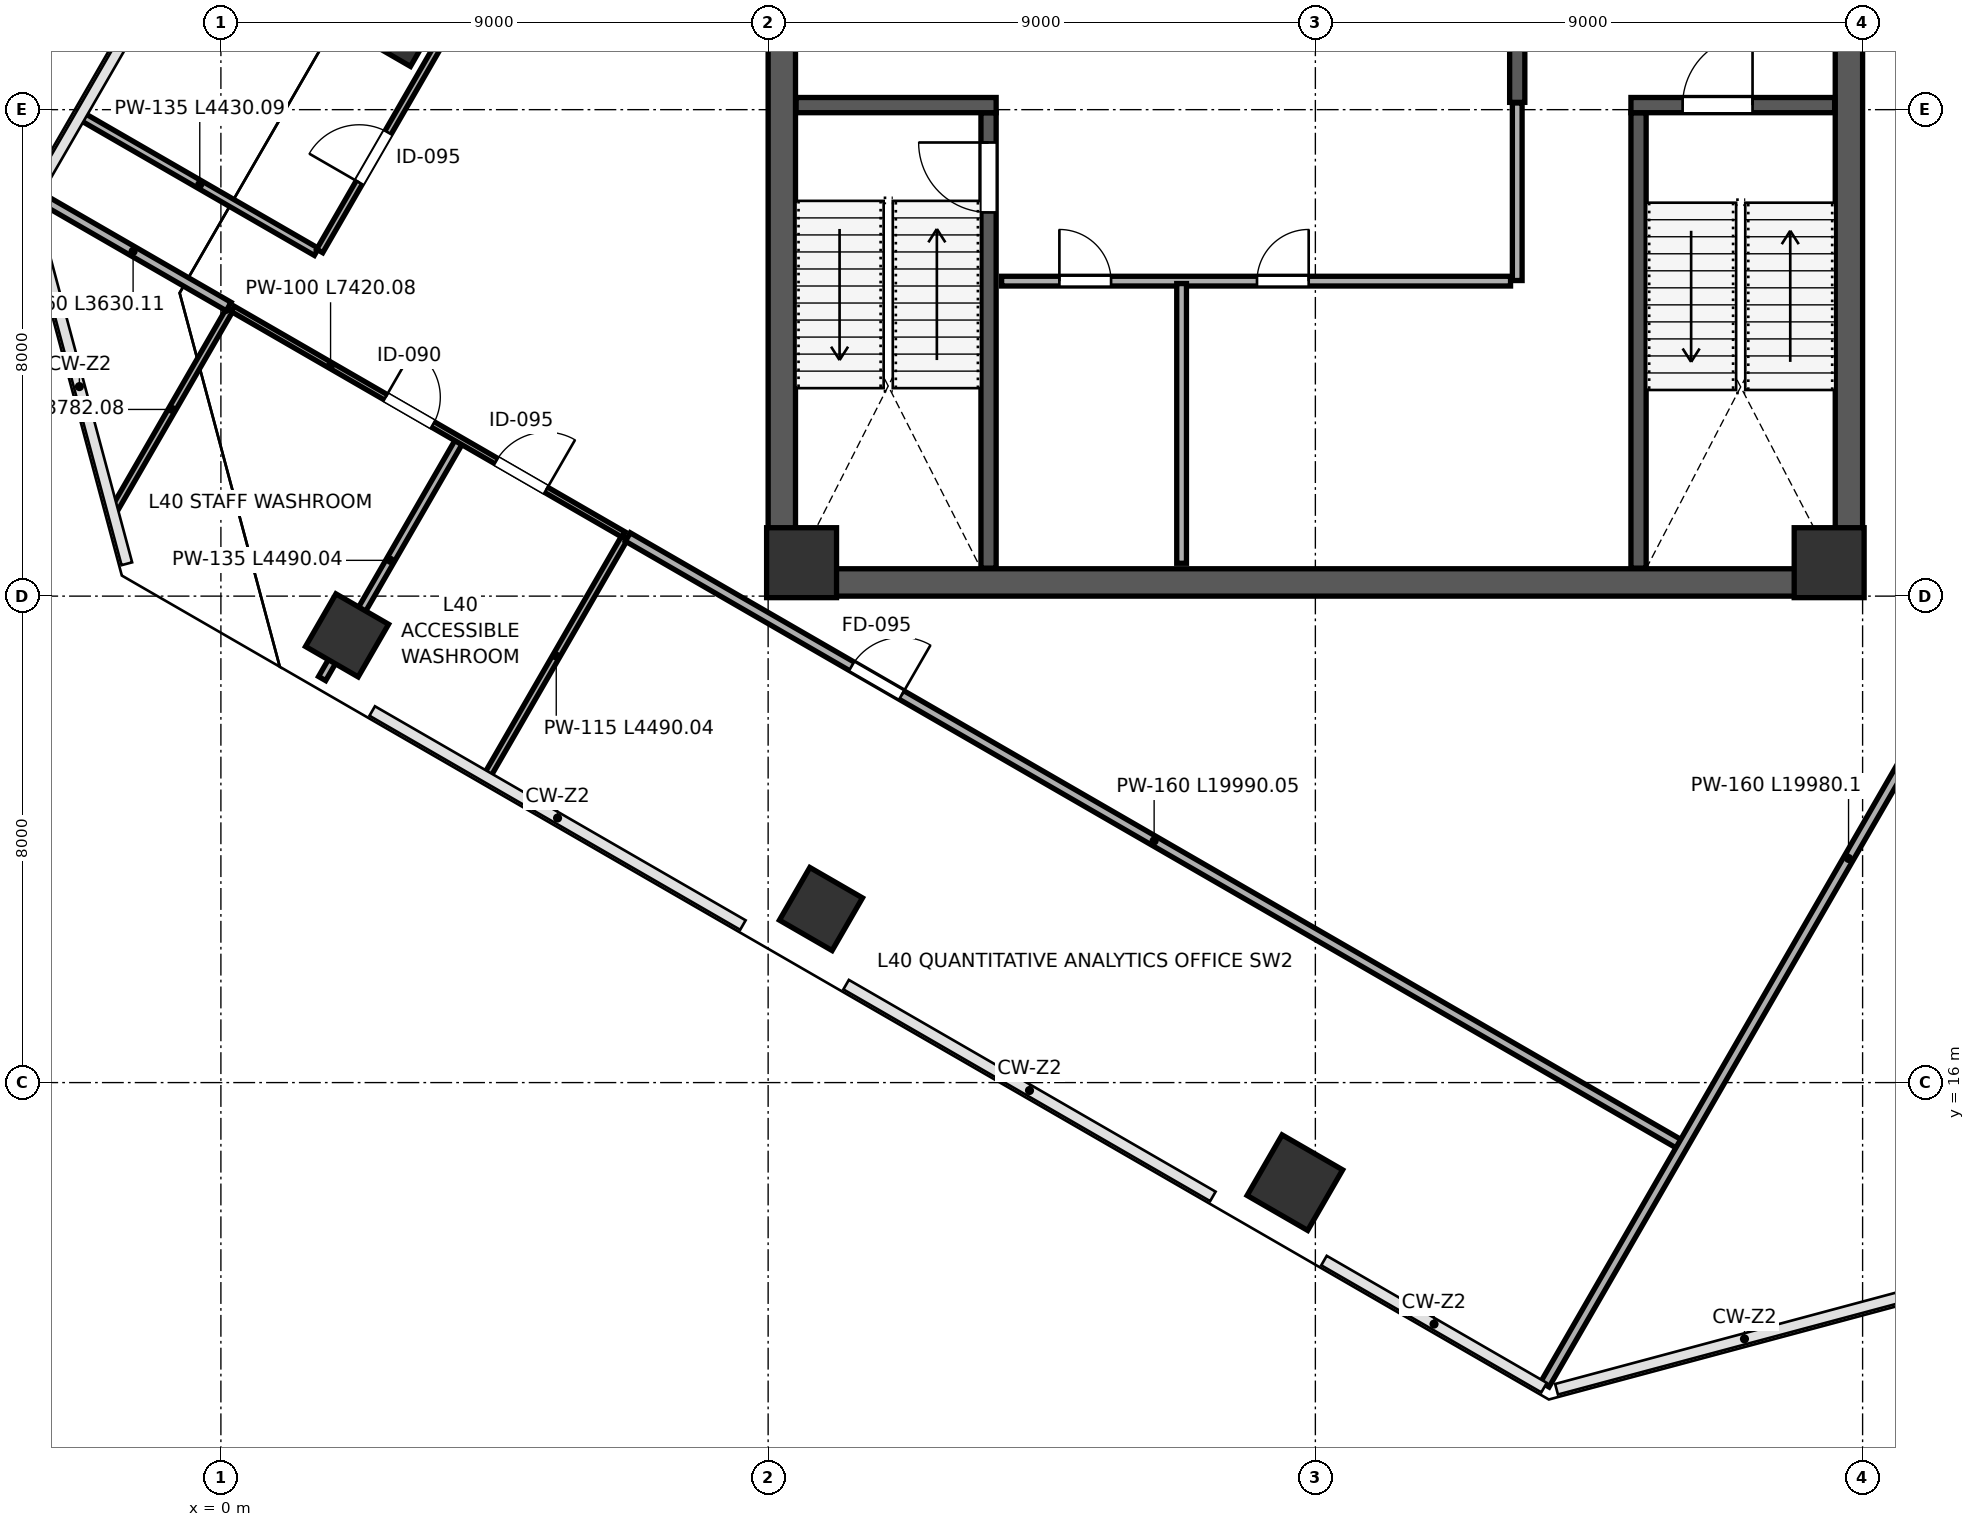
"""IFC4 building model, lengths in metres.
Left out: names, types, materials, properties, quantities, classifications, styles, units other than length and angle.
Written with IfcOpenShell. Run it as: python <this file> out.ifc"""

import sys

from ifc_helpers import new_model, si_unit, direction, frame, frame_2d, origin, origin_2d, place, context, subcontext, project, spatial, rectangle, extrude, source, transform, mapped, element, fill, save


model = new_model("IFC4")
c1 = context("Model", 3, precision=1e-05, world=origin(), true_north=direction((0.0, 1.0)))
c2 = subcontext(c1, "Body", "Model", "MODEL_VIEW")
j1 = project(units=[si_unit("LENGTHUNIT", "METRE"), si_unit("PLANEANGLEUNIT", "RADIAN")], contexts=[c1])
p1 = place(None, origin())
s1 = spatial("IfcSite", under=j1, at=p1, CompositionType="ELEMENT")
p2 = place(p1, origin())
s2 = spatial("IfcBuilding", under=s1, at=p2, CompositionType="ELEMENT")
p3 = place(p2, frame((0.0, 0.0, 179.2)))
s3 = spatial("IfcBuildingStorey", under=s2, at=p3, CompositionType="ELEMENT", Elevation=179.2)
m1 = source(origin(), c2, "Body", "SweptSolid", [
    extrude(rectangle(XDim=1.15, YDim=1.15, at=origin_2d()), origin(), (0.0, 0.0, 1.0), 4.198),
])
for number, where, z_axis, x_axis in (
    (1, (9.55, 24.55, 0.001), (0.0, 0.0, 1.0), (1.0, 0.0, 0.0)),
    (2, (26.45, 24.55, 0.001), (0.0, 0.0, 1.0), (1.0, 0.0, 0.0)),
):
    element("IfcColumn", number, at=place(p3, frame(where, z_axis=z_axis, x_axis=x_axis)), inside=s3, PredefinedType="COLUMN", context=c2, shape_type="MappedRepresentation", body=[
        mapped(m1, transform((0.0, 0.0, 0.0), scale=1.0)),
    ])
m2 = source(origin(), c2, "Body", "SweptSolid", [
    extrude(rectangle(XDim=1.0, YDim=1.0, at=origin_2d()), origin(), (0.0, 0.0, 1.0), 4.198),
])
for number, where, z_axis, x_axis in (
    (3, (2.075, 23.354, 0.001), (0.0, 0.0, 1.0), (-0.866, 0.5, 0.0)),
    (4, (9.869, 18.854, 0.001), (0.0, 0.0, 1.0), (-0.866, 0.5, 0.0)),
):
    element("IfcColumn", number, at=place(p3, frame(where, z_axis=z_axis, x_axis=x_axis)), inside=s3, PredefinedType="COLUMN", context=c2, shape_type="MappedRepresentation", body=[
        mapped(m2, transform((0.0, 0.0, 0.0), scale=1.0)),
    ])
m3 = source(origin(), c2, "Body", "SweptSolid", [
    extrude(rectangle(XDim=1.15, YDim=1.15, at=origin_2d()), origin(), (0.0, 0.0, 1.0), 4.198),
])
for number, where, z_axis, x_axis in (
    (5, (17.663, 14.354, 0.001), (0.0, 0.0, 1.0), (-0.866, 0.5, 0.0)),
    (6, (2.907, 33.497, 0.001), (0.0, 0.0, 1.0), (-0.866, 0.5, 0.0)),
):
    element("IfcColumn", number, at=place(p3, frame(where, z_axis=z_axis, x_axis=x_axis)), inside=s3, PredefinedType="COLUMN", context=c2, shape_type="MappedRepresentation", body=[
        mapped(m3, transform((0.0, 0.0, 0.0), scale=1.0)),
    ])
p4 = place(p3, frame((9.225, 24.45, 0.0), z_axis=(0.0, 0.0, 1.0), x_axis=(0.0, 1.0, 0.0)))
e7 = element("IfcWall", 7, at=p4, inside=s3, PredefinedType="SHEAR", context=c2, shape_type="SweptSolid", body=[
    extrude(rectangle(XDim=15.1, YDim=0.45, at=frame_2d((7.55, 0.0))), origin(), (0.0, 0.0, 1.0), 3.96),
])
p5 = place(p3, frame((26.775, 24.45, 0.0), z_axis=(0.0, 0.0, 1.0), x_axis=(0.0, 1.0, 0.0)))
e8 = element("IfcWall", 8, at=p5, inside=s3, PredefinedType="SHEAR", context=c2, shape_type="SweptSolid", body=[
    extrude(rectangle(XDim=15.1, YDim=0.45, at=frame_2d((7.55, 0.0))), origin(), (0.0, 0.0, 1.0), 3.96),
])
p6 = place(p5, frame((8.6, 0.0, 0.0)))
e9 = element("IfcOpeningElement", 9, at=p6, cuts=e8, PredefinedType="OPENING", context=c2, shape_type="SweptSolid", body=[
    extrude(rectangle(XDim=1.15, YDim=2.2, at=frame_2d((0.575, 1.1))), frame((0.0, 0.235, 0.0), z_axis=(0.0, -1.0, 0.0), x_axis=(1.0, 0.0, 0.0)), (0.0, 0.0, 1.0), 0.47),
])
p7 = place(p3, frame((9.0, 24.225, 0.0), z_axis=(0.0, 0.0, 1.0), x_axis=(1.0, 0.0, 0.0)))
e10 = element("IfcWall", 10, at=p7, inside=s3, PredefinedType="SHEAR", context=c2, shape_type="SweptSolid", body=[
    extrude(rectangle(XDim=18.0, YDim=0.45, at=frame_2d((9.0, 0.0))), origin(), (0.0, 0.0, 1.0), 3.96),
])
p8 = place(p3, frame((12.625, 24.46, 0.0), z_axis=(0.0, 0.0, 1.0), x_axis=(0.0, 1.0, 0.0)))
e11 = element("IfcWall", 11, at=p8, inside=s3, PredefinedType="SHEAR", context=c2, shape_type="SweptSolid", body=[
    extrude(rectangle(XDim=7.49, YDim=0.25, at=frame_2d((3.745, 0.0))), origin(), (0.0, 0.0, 1.0), 3.96),
])
p9 = place(p8, frame((5.85, 0.0, 0.0)))
e12 = element("IfcOpeningElement", 12, at=p9, cuts=e11, PredefinedType="OPENING", context=c2, shape_type="SweptSolid", body=[
    extrude(rectangle(XDim=1.15, YDim=2.2, at=frame_2d((0.575, 1.1))), frame((0.0, 0.135, 0.0), z_axis=(0.0, -1.0, 0.0), x_axis=(1.0, 0.0, 0.0)), (0.0, 0.0, 1.0), 0.27),
])
p10 = place(p3, frame((9.46, 32.075, 0.0), z_axis=(0.0, 0.0, 1.0), x_axis=(1.0, 0.0, 0.0)))
e13 = element("IfcWall", 13, at=p10, inside=s3, PredefinedType="SHEAR", context=c2, shape_type="SweptSolid", body=[
    extrude(rectangle(XDim=3.29, YDim=0.25, at=frame_2d((1.645, 0.0))), origin(), (0.0, 0.0, 1.0), 3.96),
])
p11 = place(p3, frame((23.315, 24.46, 0.0), z_axis=(0.0, 0.0, 1.0), x_axis=(0.0, 1.0, 0.0)))
e14 = element("IfcWall", 14, at=p11, inside=s3, PredefinedType="SHEAR", context=c2, shape_type="SweptSolid", body=[
    extrude(rectangle(XDim=7.49, YDim=0.25, at=frame_2d((3.745, 0.0))), origin(), (0.0, 0.0, 1.0), 3.96),
])
p12 = place(p3, frame((23.19, 32.075, 0.0), z_axis=(0.0, 0.0, 1.0), x_axis=(1.0, 0.0, 0.0)))
e15 = element("IfcWall", 15, at=p12, inside=s3, PredefinedType="SHEAR", context=c2, shape_type="SweptSolid", body=[
    extrude(rectangle(XDim=3.35, YDim=0.25, at=frame_2d((1.675, 0.0))), origin(), (0.0, 0.0, 1.0), 3.96),
])
p13 = place(p12, frame((0.85, 0.0, 0.0)))
e16 = element("IfcOpeningElement", 16, at=p13, cuts=e15, PredefinedType="OPENING", context=c2, shape_type="SweptSolid", body=[
    extrude(rectangle(XDim=1.15, YDim=2.2, at=frame_2d((0.575, 1.1))), frame((0.0, 0.135, 0.0), z_axis=(0.0, -1.0, 0.0), x_axis=(1.0, 0.0, 0.0)), (0.0, 0.0, 1.0), 0.27),
])
p14 = place(p3, frame((21.32, 32.12, 0.0), z_axis=(0.0, 0.0, 1.0), x_axis=(0.0, 1.0, 0.0)))
e17 = element("IfcWall", 17, at=p14, inside=s3, PredefinedType="SHEAR", context=c2, shape_type="SweptSolid", body=[
    extrude(rectangle(XDim=7.42, YDim=0.25, at=frame_2d((3.71, 0.0))), origin(), (0.0, 0.0, 1.0), 3.96),
])
p15 = place(p14, frame((1.4, 0.0, 0.0)))
e18 = element("IfcOpeningElement", 18, at=p15, cuts=e17, PredefinedType="OPENING", context=c2, shape_type="SweptSolid", body=[
    extrude(rectangle(XDim=1.15, YDim=2.2, at=frame_2d((0.575, 1.1))), frame((0.0, 0.135, 0.0), z_axis=(0.0, -1.0, 0.0), x_axis=(1.0, 0.0, 0.0)), (0.0, 0.0, 1.0), 0.27),
])
p16 = place(p3, frame((12.84, 29.18, 0.0), z_axis=(0.0, 0.0, 1.0), x_axis=(1.0, 0.0, 0.0)))
e19 = element("IfcWall", 19, at=p16, inside=s3, PredefinedType="PARTITIONING", context=c2, shape_type="SweptSolid", body=[
    extrude(rectangle(XDim=8.37, YDim=0.16, at=frame_2d((4.185, 0.0))), origin(), (0.0, 0.0, 1.0), 3.96),
])
p17 = place(p16, frame((0.95, 0.0, 0.0)))
e20 = element("IfcOpeningElement", 20, at=p17, cuts=e19, PredefinedType="OPENING", context=c2, shape_type="SweptSolid", body=[
    extrude(rectangle(XDim=0.85, YDim=2.1, at=frame_2d((0.425, 1.05))), frame((0.0, 0.09, 0.0), z_axis=(0.0, -1.0, 0.0), x_axis=(1.0, 0.0, 0.0)), (0.0, 0.0, 1.0), 0.18),
])
p18 = place(p16, frame((4.2, 0.0, 0.0)))
e21 = element("IfcOpeningElement", 21, at=p18, cuts=e19, PredefinedType="OPENING", context=c2, shape_type="SweptSolid", body=[
    extrude(rectangle(XDim=0.85, YDim=2.1, at=frame_2d((0.425, 1.05))), frame((0.0, 0.09, 0.0), z_axis=(0.0, -1.0, 0.0), x_axis=(1.0, 0.0, 0.0)), (0.0, 0.0, 1.0), 0.18),
])
p19 = place(p3, frame((15.8, 24.54, 0.0), z_axis=(0.0, 0.0, 1.0), x_axis=(0.0, 1.0, 0.0)))
e22 = element("IfcWall", 22, at=p19, inside=s3, PredefinedType="PARTITIONING", context=c2, shape_type="SweptSolid", body=[
    extrude(rectangle(XDim=4.6, YDim=0.16, at=frame_2d((2.3, 0.0))), origin(), (0.0, 0.0, 1.0), 3.96),
])
p20 = place(p3, frame((21.32, 29.19, 0.0), z_axis=(0.0, 0.0, 1.0), x_axis=(0.0, 1.0, 0.0)))
e23 = element("IfcWall", 23, at=p20, inside=s3, PredefinedType="PARTITIONING", context=c2, shape_type="SweptSolid", body=[
    extrude(rectangle(XDim=2.92, YDim=0.16, at=frame_2d((1.46, 0.0))), origin(), (0.0, 0.0, 1.0), 3.96),
])
p21 = place(p3, frame((-1.749, 25.432, 0.0), z_axis=(0.0, 0.0, 1.0), x_axis=(0.500013012896, 0.866017890655, 0.0)))
e24 = element("IfcWall", 24, at=p21, inside=s3, PredefinedType="PARTITIONING", context=c2, shape_type="SweptSolid", body=[
    extrude(rectangle(XDim=3.782, YDim=0.115, at=frame_2d((1.891, 0.0))), origin(), (0.0, 0.0, 1.0), 3.96),
])
p22 = place(p3, frame((-3.016, 30.577, 0.0), z_axis=(0.0, 0.0, 1.0), x_axis=(0.866011990707, -0.500023231413, 0.0)))
e25 = element("IfcWall", 25, at=p22, inside=s3, PredefinedType="PARTITIONING", context=c2, shape_type="SweptSolid", body=[
    extrude(rectangle(XDim=3.63, YDim=0.16, at=frame_2d((1.815, 0.0))), origin(), (0.0, 0.0, 1.0), 3.96),
])
p23 = place(p3, frame((1.665, 22.644, 0.0), z_axis=(0.0, 0.0, 1.0), x_axis=(0.499981332661, 0.866036181109, 0.0)))
e26 = element("IfcWall", 26, at=p23, inside=s3, PredefinedType="PARTITIONING", context=c2, shape_type="SweptSolid", body=[
    extrude(rectangle(XDim=4.49, YDim=0.135, at=frame_2d((2.245, 0.0))), origin(), (0.0, 0.0, 1.0), 3.195),
])
p24 = place(p3, frame((4.393, 21.069, 0.0), z_axis=(0.0, 0.0, 1.0), x_axis=(0.499998569178, 0.866026229868, 0.0)))
e27 = element("IfcWall", 27, at=p24, inside=s3, PredefinedType="PARTITIONING", context=c2, shape_type="SweptSolid", body=[
    extrude(rectangle(XDim=4.49, YDim=0.115, at=frame_2d((2.245, 0.0))), origin(), (0.0, 0.0, 1.0), 3.195),
])
p25 = place(p3, frame((0.197, 28.722, 0.0), z_axis=(0.0, 0.0, 1.0), x_axis=(0.866017374541, -0.5000139068, 0.0)))
e28 = element("IfcWall", 28, at=p25, inside=s3, PredefinedType="PARTITIONING", context=c2, shape_type="SweptSolid", body=[
    extrude(rectangle(XDim=7.42, YDim=0.1, at=frame_2d((3.71, 0.0))), origin(), (0.0, 0.0, 1.0), 3.96),
])
p26 = place(p25, frame((2.9, 0.0, 0.0)))
e29 = element("IfcOpeningElement", 29, at=p26, cuts=e28, PredefinedType="OPENING", context=c2, shape_type="SweptSolid", body=[
    extrude(rectangle(XDim=0.9, YDim=2.15, at=frame_2d((0.45, 1.075))), frame((0.0, 0.06, 0.0), z_axis=(0.0, -1.0, 0.0), x_axis=(1.0, 0.0, 0.0)), (0.0, 0.0, 1.0), 0.12),
])
p27 = place(p25, frame((5.0, 0.0, 0.0)))
e30 = element("IfcOpeningElement", 30, at=p27, cuts=e28, PredefinedType="OPENING", context=c2, shape_type="SweptSolid", body=[
    extrude(rectangle(XDim=0.95, YDim=2.15, at=frame_2d((0.475, 1.075))), frame((0.0, 0.06, 0.0), z_axis=(0.0, -1.0, 0.0), x_axis=(1.0, 0.0, 0.0)), (0.0, 0.0, 1.0), 0.12),
])
p28 = place(p3, frame((6.692, 24.972, 0.0), z_axis=(0.0, 0.0, 1.0), x_axis=(0.866021861762, -0.500006134913, 0.0)))
e31 = element("IfcWall", 31, at=p28, inside=s3, PredefinedType="PARTITIONING", context=c2, shape_type="SweptSolid", body=[
    extrude(rectangle(XDim=19.99, YDim=0.16, at=frame_2d((9.995, 0.0))), origin(), (0.0, 0.0, 1.0), 3.96),
])
p29 = place(p28, frame((4.25, 0.0, 0.0)))
e32 = element("IfcOpeningElement", 32, at=p29, cuts=e31, PredefinedType="OPENING", context=c2, shape_type="SweptSolid", body=[
    extrude(rectangle(XDim=0.95, YDim=2.15, at=frame_2d((0.475, 1.075))), frame((0.0, 0.09, 0.0), z_axis=(0.0, -1.0, 0.0), x_axis=(1.0, 0.0, 0.0)), (0.0, 0.0, 1.0), 0.18),
])
p30 = place(p3, frame((-2.266, 31.876, 0.0), z_axis=(0.0, 0.0, 1.0), x_axis=(0.866026823135, -0.499997541604, 0.0)))
e33 = element("IfcWall", 33, at=p30, inside=s3, PredefinedType="PARTITIONING", context=c2, shape_type="SweptSolid", body=[
    extrude(rectangle(XDim=4.43, YDim=0.135, at=frame_2d((2.215, 0.0))), origin(), (0.0, 0.0, 1.0), 3.96),
])
p31 = place(p3, frame((1.625, 29.676, 0.0), z_axis=(0.0, 0.0, 1.0), x_axis=(0.500002707681, 0.866023840498, 0.0)))
e34 = element("IfcWall", 34, at=p31, inside=s3, PredefinedType="PARTITIONING", context=c2, shape_type="SweptSolid", body=[
    extrude(rectangle(XDim=23.1, YDim=0.115, at=frame_2d((11.55, 0.0))), origin(), (0.0, 0.0, 1.0), 3.96),
])
p32 = place(p31, frame((1.3, 0.0, 0.0)))
e35 = element("IfcOpeningElement", 35, at=p32, cuts=e34, PredefinedType="OPENING", context=c2, shape_type="SweptSolid", body=[
    extrude(rectangle(XDim=0.95, YDim=2.15, at=frame_2d((0.475, 1.075))), frame((0.0, 0.067, 0.0), z_axis=(0.0, -1.0, 0.0), x_axis=(1.0, 0.0, 0.0)), (0.0, 0.0, 1.0), 0.135),
])
p33 = place(p31, frame((13.8, 0.0, 0.0)))
e36 = element("IfcOpeningElement", 36, at=p33, cuts=e34, PredefinedType="OPENING", context=c2, shape_type="SweptSolid", body=[
    extrude(rectangle(XDim=0.95, YDim=2.15, at=frame_2d((0.475, 1.075))), frame((0.0, 0.067, 0.0), z_axis=(0.0, -1.0, 0.0), x_axis=(1.0, 0.0, 0.0)), (0.0, 0.0, 1.0), 0.135),
])
p34 = place(p3, frame((21.774, 11.034, 0.0), z_axis=(0.0, 0.0, 1.0), x_axis=(0.500008037328, 0.866020763381, 0.0)))
e37 = element("IfcWall", 37, at=p34, inside=s3, PredefinedType="PARTITIONING", context=c2, shape_type="SweptSolid", body=[
    extrude(rectangle(XDim=19.98, YDim=0.16, at=frame_2d((9.99, 0.0))), origin(), (0.0, 0.0, 1.0), 3.96),
])
m4 = source(origin(), c2, "Body", "SweptSolid", [
    extrude(rectangle(XDim=1.15, YDim=2.2, at=frame_2d((0.575, 1.1))), frame((0.0, 0.025, 0.0), z_axis=(0.0, -1.0, 0.0), x_axis=(1.0, 0.0, 0.0)), (0.0, 0.0, 1.0), 0.05),
])
p35 = place(p9, origin())
e38 = element("IfcDoor", 38, at=p35, inside=s3, OperationType="SINGLE_SWING_RIGHT", PredefinedType="DOOR", context=c2, shape_type="MappedRepresentation", body=[
    mapped(m4, transform((0.0, 0.0, 0.0), scale=1.0)),
])
fill(e12, e38)
p36 = place(p13, origin())
e39 = element("IfcDoor", 39, at=p36, inside=s3, OperationType="SINGLE_SWING_RIGHT", PredefinedType="DOOR", context=c2, shape_type="MappedRepresentation", body=[
    mapped(m4, transform((0.0, 0.0, 0.0), scale=1.0)),
])
fill(e16, e39)
m5 = source(origin(), c2, "Body", "SweptSolid", [
    extrude(rectangle(XDim=0.85, YDim=2.1, at=frame_2d((0.425, 1.05))), frame((0.0, 0.025, 0.0), z_axis=(0.0, -1.0, 0.0), x_axis=(1.0, 0.0, 0.0)), (0.0, 0.0, 1.0), 0.05),
])
p37 = place(p17, origin())
e40 = element("IfcDoor", 40, at=p37, inside=s3, OperationType="SINGLE_SWING_LEFT", PredefinedType="DOOR", context=c2, shape_type="MappedRepresentation", body=[
    mapped(m5, transform((0.0, 0.0, 0.0), scale=1.0)),
])
fill(e20, e40)
p38 = place(p18, origin())
e41 = element("IfcDoor", 41, at=p38, inside=s3, OperationType="SINGLE_SWING_RIGHT", PredefinedType="DOOR", context=c2, shape_type="MappedRepresentation", body=[
    mapped(m5, transform((0.0, 0.0, 0.0), scale=1.0)),
])
fill(e21, e41)
m6 = source(origin(), c2, "Body", "SweptSolid", [
    extrude(rectangle(XDim=0.9, YDim=2.15, at=frame_2d((0.45, 1.075))), frame((0.0, 0.025, 0.0), z_axis=(0.0, -1.0, 0.0), x_axis=(1.0, 0.0, 0.0)), (0.0, 0.0, 1.0), 0.05),
])
p39 = place(p26, origin())
e42 = element("IfcDoor", 42, at=p39, inside=s3, OperationType="SINGLE_SWING_LEFT", PredefinedType="DOOR", context=c2, shape_type="MappedRepresentation", body=[
    mapped(m6, transform((0.0, 0.0, 0.0), scale=1.0)),
])
fill(e29, e42)
m7 = source(origin(), c2, "Body", "SweptSolid", [
    extrude(rectangle(XDim=0.95, YDim=2.15, at=frame_2d((0.475, 1.075))), frame((0.0, 0.025, 0.0), z_axis=(0.0, -1.0, 0.0), x_axis=(1.0, 0.0, 0.0)), (0.0, 0.0, 1.0), 0.05),
])
p40 = place(p27, origin())
e43 = element("IfcDoor", 43, at=p40, inside=s3, OperationType="SINGLE_SWING_RIGHT", PredefinedType="DOOR", context=c2, shape_type="MappedRepresentation", body=[
    mapped(m7, transform((0.0, 0.0, 0.0), scale=1.0)),
])
fill(e30, e43)
m8 = source(origin(), c2, "Body", "SweptSolid", [
    extrude(rectangle(XDim=0.95, YDim=2.15, at=frame_2d((0.475, 1.075))), frame((0.0, 0.025, 0.0), z_axis=(0.0, -1.0, 0.0), x_axis=(1.0, 0.0, 0.0)), (0.0, 0.0, 1.0), 0.05),
])
p41 = place(p29, origin())
e44 = element("IfcDoor", 44, at=p41, inside=s3, OperationType="SINGLE_SWING_RIGHT", PredefinedType="DOOR", context=c2, shape_type="MappedRepresentation", body=[
    mapped(m8, transform((0.0, 0.0, 0.0), scale=1.0)),
])
fill(e32, e44)
p42 = place(p32, origin())
e45 = element("IfcDoor", 45, at=p42, inside=s3, OperationType="SINGLE_SWING_LEFT", PredefinedType="DOOR", context=c2, shape_type="MappedRepresentation", body=[
    mapped(m7, transform((0.0, 0.0, 0.0), scale=1.0)),
])
fill(e35, e45)
save(model, sys.argv[1])
